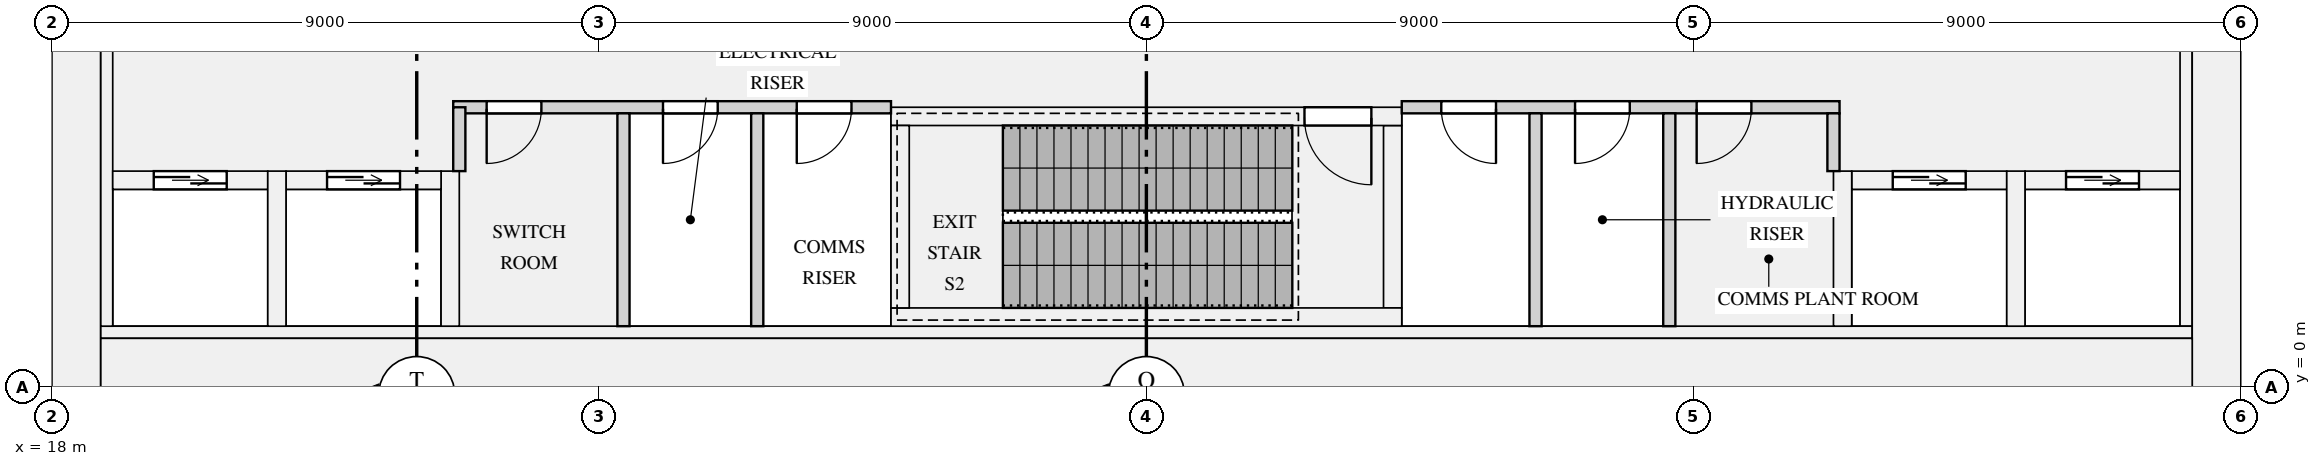
"""IFC4 building model, lengths in metres.
Left out: names, types, materials, properties, quantities, classifications, styles, units other than length and angle.
Written with IfcOpenShell. Run it as: python <this file> out.ifc"""

import sys

from ifc_helpers import new_model, si_unit, direction, frame, frame_2d, origin, place, context, subcontext, project, spatial, rectangle, extrude, element, fill, save


model = new_model("IFC4")
c1 = context("Model", 3, precision=1e-05, world=origin(), true_north=direction((0.0, 1.0)))
c2 = subcontext(c1, "Body", "Model", "MODEL_VIEW")
j1 = project(units=[si_unit("LENGTHUNIT", "METRE"), si_unit("PLANEANGLEUNIT", "RADIAN")], contexts=[c1])
p1 = place(None, origin())
s1 = spatial("IfcSite", under=j1, at=p1, CompositionType="ELEMENT")
p2 = place(p1, origin())
s2 = spatial("IfcBuilding", under=s1, at=p2, CompositionType="ELEMENT")
p3 = place(p2, frame((0.0, 0.0, 130.8)))
s3 = spatial("IfcBuildingStorey", under=s2, at=p3, CompositionType="ELEMENT", Elevation=130.8)
for number, where, z_axis, x_axis in (
    (1, (18.4, 0.0, 0.0), (0.0, 0.0, 1.0), (0.0, 1.0, 0.0)),
    (2, (53.6, 0.0, 0.0), (0.0, 0.0, 1.0), (0.0, 1.0, 0.0)),
):
    element("IfcWall", number, at=place(p3, frame(where, z_axis=z_axis, x_axis=x_axis)), inside=s3, PredefinedType="SHEAR", context=c2, shape_type="SweptSolid", body=[
        extrude(rectangle(XDim=12.5, YDim=0.8, at=frame_2d((6.25, 0.0))), origin(), (0.0, 0.0, 1.0), 6.3),
    ])
p4 = place(p3, frame((18.8, 0.4, 0.0), z_axis=(0.0, 0.0, 1.0), x_axis=(1.0, 0.0, 0.0)))
e3 = element("IfcWall", 3, at=p4, inside=s3, PredefinedType="SHEAR", context=c2, shape_type="SweptSolid", body=[
    extrude(rectangle(XDim=34.4, YDim=0.8, at=frame_2d((17.2, 0.0))), origin(), (0.0, 0.0, 1.0), 6.3),
])
for number, where, z_axis, x_axis in (
    (4, (18.9, 1.0, 0.0), (0.0, 0.0, 1.0), (0.0, 1.0, 0.0)),
    (5, (53.1, 1.0, 0.0), (0.0, 0.0, 1.0), (0.0, 1.0, 0.0)),
):
    element("IfcWall", number, at=place(p3, frame(where, z_axis=z_axis, x_axis=x_axis)), inside=s3, PredefinedType="SHEAR", context=c2, shape_type="SweptSolid", body=[
        extrude(rectangle(XDim=10.9, YDim=0.2, at=frame_2d((5.45, 0.0))), origin(), (0.0, 0.0, 1.0), 6.3),
    ])
p5 = place(p3, frame((18.8, 0.9, 0.0), z_axis=(0.0, 0.0, 1.0), x_axis=(1.0, 0.0, 0.0)))
e6 = element("IfcWall", 6, at=p5, inside=s3, PredefinedType="SHEAR", context=c2, shape_type="SweptSolid", body=[
    extrude(rectangle(XDim=34.4, YDim=0.2, at=frame_2d((17.2, 0.0))), origin(), (0.0, 0.0, 1.0), 6.3),
])
p6 = place(p3, frame((19.0, 3.4, 0.0), z_axis=(0.0, 0.0, 1.0), x_axis=(1.0, 0.0, 0.0)))
e7 = element("IfcWall", 7, at=p6, inside=s3, PredefinedType="SHEAR", context=c2, shape_type="SweptSolid", body=[
    extrude(rectangle(XDim=2.55, YDim=0.3, at=frame_2d((1.275, 0.0))), origin(), (0.0, 0.0, 1.0), 6.3),
])
p7 = place(p6, frame((0.675, 0.0, 0.0)))
e8 = element("IfcOpeningElement", 8, at=p7, cuts=e7, PredefinedType="OPENING", context=c2, shape_type="SweptSolid", body=[
    extrude(rectangle(XDim=1.2, YDim=2.1, at=frame_2d((0.6, 1.05))), frame((0.0, 0.16, 0.0), z_axis=(0.0, -1.0, 0.0), x_axis=(1.0, 0.0, 0.0)), (0.0, 0.0, 1.0), 0.32),
])
p8 = place(p3, frame((21.85, 3.4, 0.0), z_axis=(0.0, 0.0, 1.0), x_axis=(1.0, 0.0, 0.0)))
e9 = element("IfcWall", 9, at=p8, inside=s3, PredefinedType="SHEAR", context=c2, shape_type="SweptSolid", body=[
    extrude(rectangle(XDim=2.55, YDim=0.3, at=frame_2d((1.275, 0.0))), origin(), (0.0, 0.0, 1.0), 6.3),
])
p9 = place(p8, frame((0.675, 0.0, 0.0)))
e10 = element("IfcOpeningElement", 10, at=p9, cuts=e9, PredefinedType="OPENING", context=c2, shape_type="SweptSolid", body=[
    extrude(rectangle(XDim=1.2, YDim=2.1, at=frame_2d((0.6, 1.05))), frame((0.0, 0.16, 0.0), z_axis=(0.0, -1.0, 0.0), x_axis=(1.0, 0.0, 0.0)), (0.0, 0.0, 1.0), 0.32),
])
for number, where, z_axis, x_axis in (
    (11, (21.7, 1.0, 0.0), (0.0, 0.0, 1.0), (0.0, 1.0, 0.0)),
    (12, (24.55, 1.0, 0.0), (0.0, 0.0, 1.0), (0.0, 1.0, 0.0)),
):
    element("IfcWall", number, at=place(p3, frame(where, z_axis=z_axis, x_axis=x_axis)), inside=s3, PredefinedType="SHEAR", context=c2, shape_type="SweptSolid", body=[
        extrude(rectangle(XDim=2.55, YDim=0.3, at=frame_2d((1.275, 0.0))), origin(), (0.0, 0.0, 1.0), 6.3),
    ])
p10 = place(p3, frame((47.6, 3.4, 0.0), z_axis=(0.0, 0.0, 1.0), x_axis=(1.0, 0.0, 0.0)))
e13 = element("IfcWall", 13, at=p10, inside=s3, PredefinedType="SHEAR", context=c2, shape_type="SweptSolid", body=[
    extrude(rectangle(XDim=2.55, YDim=0.3, at=frame_2d((1.275, 0.0))), origin(), (0.0, 0.0, 1.0), 6.3),
])
p11 = place(p10, frame((0.675, 0.0, 0.0)))
e14 = element("IfcOpeningElement", 14, at=p11, cuts=e13, PredefinedType="OPENING", context=c2, shape_type="SweptSolid", body=[
    extrude(rectangle(XDim=1.2, YDim=2.1, at=frame_2d((0.6, 1.05))), frame((0.0, 0.16, 0.0), z_axis=(0.0, -1.0, 0.0), x_axis=(1.0, 0.0, 0.0)), (0.0, 0.0, 1.0), 0.32),
])
p12 = place(p3, frame((47.45, 1.0, 0.0), z_axis=(0.0, 0.0, 1.0), x_axis=(0.0, 1.0, 0.0)))
e15 = element("IfcWall", 15, at=p12, inside=s3, PredefinedType="SHEAR", context=c2, shape_type="SweptSolid", body=[
    extrude(rectangle(XDim=2.55, YDim=0.3, at=frame_2d((1.275, 0.0))), origin(), (0.0, 0.0, 1.0), 6.3),
])
p13 = place(p3, frame((50.45, 3.4, 0.0), z_axis=(0.0, 0.0, 1.0), x_axis=(1.0, 0.0, 0.0)))
e16 = element("IfcWall", 16, at=p13, inside=s3, PredefinedType="SHEAR", context=c2, shape_type="SweptSolid", body=[
    extrude(rectangle(XDim=2.55, YDim=0.3, at=frame_2d((1.275, 0.0))), origin(), (0.0, 0.0, 1.0), 6.3),
])
p14 = place(p13, frame((0.675, 0.0, 0.0)))
e17 = element("IfcOpeningElement", 17, at=p14, cuts=e16, PredefinedType="OPENING", context=c2, shape_type="SweptSolid", body=[
    extrude(rectangle(XDim=1.2, YDim=2.1, at=frame_2d((0.6, 1.05))), frame((0.0, 0.16, 0.0), z_axis=(0.0, -1.0, 0.0), x_axis=(1.0, 0.0, 0.0)), (0.0, 0.0, 1.0), 0.32),
])
p15 = place(p3, frame((50.3, 1.0, 0.0), z_axis=(0.0, 0.0, 1.0), x_axis=(0.0, 1.0, 0.0)))
e18 = element("IfcWall", 18, at=p15, inside=s3, PredefinedType="SHEAR", context=c2, shape_type="SweptSolid", body=[
    extrude(rectangle(XDim=2.55, YDim=0.3, at=frame_2d((1.275, 0.0))), origin(), (0.0, 0.0, 1.0), 6.3),
])
p16 = place(p3, frame((31.8, 1.15, 0.0), z_axis=(0.0, 0.0, 1.0), x_axis=(1.0, 0.0, 0.0)))
e19 = element("IfcWall", 19, at=p16, inside=s3, PredefinedType="SHEAR", context=c2, shape_type="SweptSolid", body=[
    extrude(rectangle(XDim=8.4, YDim=0.3, at=frame_2d((4.2, 0.0))), origin(), (0.0, 0.0, 1.0), 6.3),
])
p17 = place(p3, frame((31.8, 4.45, 0.0), z_axis=(0.0, 0.0, 1.0), x_axis=(1.0, 0.0, 0.0)))
e20 = element("IfcWall", 20, at=p17, inside=s3, PredefinedType="SHEAR", context=c2, shape_type="SweptSolid", body=[
    extrude(rectangle(XDim=8.4, YDim=0.3, at=frame_2d((4.2, 0.0))), origin(), (0.0, 0.0, 1.0), 6.3),
])
p18 = place(p17, frame((6.8, 0.0, 0.0)))
e21 = element("IfcOpeningElement", 21, at=p18, cuts=e20, PredefinedType="OPENING", context=c2, shape_type="SweptSolid", body=[
    extrude(rectangle(XDim=1.1, YDim=2.1, at=frame_2d((0.55, 1.05))), frame((0.0, 0.16, 0.0), z_axis=(0.0, -1.0, 0.0), x_axis=(1.0, 0.0, 0.0)), (0.0, 0.0, 1.0), 0.32),
])
for number, where, z_axis, x_axis in (
    (22, (31.95, 1.3, 0.0), (0.0, 0.0, 1.0), (0.0, 1.0, 0.0)),
    (23, (40.05, 1.3, 0.0), (0.0, 0.0, 1.0), (0.0, 1.0, 0.0)),
):
    element("IfcWall", number, at=place(p3, frame(where, z_axis=z_axis, x_axis=x_axis)), inside=s3, PredefinedType="SHEAR", context=c2, shape_type="SweptSolid", body=[
        extrude(rectangle(XDim=3.0, YDim=0.3, at=frame_2d((1.5, 0.0))), origin(), (0.0, 0.0, 1.0), 6.3),
    ])
p19 = place(p3, frame((24.6, 4.6, 0.0), z_axis=(0.0, 0.0, 1.0), x_axis=(1.0, 0.0, 0.0)))
e24 = element("IfcWall", 24, at=p19, inside=s3, PredefinedType="PARTITIONING", context=c2, shape_type="SweptSolid", body=[
    extrude(rectangle(XDim=7.2, YDim=0.2, at=frame_2d((3.6, 0.0))), origin(), (0.0, 0.0, 1.0), 5.8),
])
p20 = place(p19, frame((0.55, 0.0, 0.0)))
e25 = element("IfcOpeningElement", 25, at=p20, cuts=e24, PredefinedType="OPENING", context=c2, shape_type="SweptSolid", body=[
    extrude(rectangle(XDim=0.9, YDim=2.1, at=frame_2d((0.45, 1.05))), frame((0.0, 0.11, 0.0), z_axis=(0.0, -1.0, 0.0), x_axis=(1.0, 0.0, 0.0)), (0.0, 0.0, 1.0), 0.22),
])
p21 = place(p19, frame((3.45, 0.0, 0.0)))
e26 = element("IfcOpeningElement", 26, at=p21, cuts=e24, PredefinedType="OPENING", context=c2, shape_type="SweptSolid", body=[
    extrude(rectangle(XDim=0.9, YDim=2.1, at=frame_2d((0.45, 1.05))), frame((0.0, 0.11, 0.0), z_axis=(0.0, -1.0, 0.0), x_axis=(1.0, 0.0, 0.0)), (0.0, 0.0, 1.0), 0.22),
])
p22 = place(p19, frame((5.65, 0.0, 0.0)))
e27 = element("IfcOpeningElement", 27, at=p22, cuts=e24, PredefinedType="OPENING", context=c2, shape_type="SweptSolid", body=[
    extrude(rectangle(XDim=0.9, YDim=2.1, at=frame_2d((0.45, 1.05))), frame((0.0, 0.11, 0.0), z_axis=(0.0, -1.0, 0.0), x_axis=(1.0, 0.0, 0.0)), (0.0, 0.0, 1.0), 0.22),
])
p23 = place(p3, frame((40.2, 4.6, 0.0), z_axis=(0.0, 0.0, 1.0), x_axis=(1.0, 0.0, 0.0)))
e28 = element("IfcWall", 28, at=p23, inside=s3, PredefinedType="PARTITIONING", context=c2, shape_type="SweptSolid", body=[
    extrude(rectangle(XDim=7.2, YDim=0.2, at=frame_2d((3.6, 0.0))), origin(), (0.0, 0.0, 1.0), 5.8),
])
p24 = place(p23, frame((4.85, 0.0, 0.0)))
e29 = element("IfcOpeningElement", 29, at=p24, cuts=e28, PredefinedType="OPENING", context=c2, shape_type="SweptSolid", body=[
    extrude(rectangle(XDim=0.9, YDim=2.1, at=frame_2d((0.45, 1.05))), frame((0.0, 0.11, 0.0), z_axis=(0.0, -1.0, 0.0), x_axis=(1.0, 0.0, 0.0)), (0.0, 0.0, 1.0), 0.22),
])
p25 = place(p23, frame((0.65, 0.0, 0.0)))
e30 = element("IfcOpeningElement", 30, at=p25, cuts=e28, PredefinedType="OPENING", context=c2, shape_type="SweptSolid", body=[
    extrude(rectangle(XDim=0.9, YDim=2.1, at=frame_2d((0.45, 1.05))), frame((0.0, 0.11, 0.0), z_axis=(0.0, -1.0, 0.0), x_axis=(1.0, 0.0, 0.0)), (0.0, 0.0, 1.0), 0.22),
])
p26 = place(p23, frame((2.85, 0.0, 0.0)))
e31 = element("IfcOpeningElement", 31, at=p26, cuts=e28, PredefinedType="OPENING", context=c2, shape_type="SweptSolid", body=[
    extrude(rectangle(XDim=0.9, YDim=2.1, at=frame_2d((0.45, 1.05))), frame((0.0, 0.11, 0.0), z_axis=(0.0, -1.0, 0.0), x_axis=(1.0, 0.0, 0.0)), (0.0, 0.0, 1.0), 0.22),
])
for number, where, z_axis, x_axis in (
    (32, (27.4, 1.0, 0.0), (0.0, 0.0, 1.0), (0.0, 1.0, 0.0)),
    (33, (29.6, 1.0, 0.0), (0.0, 0.0, 1.0), (0.0, 1.0, 0.0)),
    (34, (42.4, 1.0, 0.0), (0.0, 0.0, 1.0), (0.0, 1.0, 0.0)),
    (35, (44.6, 1.0, 0.0), (0.0, 0.0, 1.0), (0.0, 1.0, 0.0)),
):
    element("IfcWall", number, at=place(p3, frame(where, z_axis=z_axis, x_axis=x_axis)), inside=s3, PredefinedType="PARTITIONING", context=c2, shape_type="SweptSolid", body=[
        extrude(rectangle(XDim=3.5, YDim=0.2, at=frame_2d((1.75, 0.0))), origin(), (0.0, 0.0, 1.0), 5.8),
    ])
p27 = place(p3, frame((24.7, 3.55, 0.0), z_axis=(0.0, 0.0, 1.0), x_axis=(0.0, 1.0, 0.0)))
e36 = element("IfcWall", 36, at=p27, inside=s3, PredefinedType="PARTITIONING", context=c2, shape_type="SweptSolid", body=[
    extrude(rectangle(XDim=1.05, YDim=0.2, at=frame_2d((0.525, 0.0))), origin(), (0.0, 0.0, 1.0), 5.8),
])
p28 = place(p3, frame((47.3, 3.55, 0.0), z_axis=(0.0, 0.0, 1.0), x_axis=(0.0, 1.0, 0.0)))
e37 = element("IfcWall", 37, at=p28, inside=s3, PredefinedType="PARTITIONING", context=c2, shape_type="SweptSolid", body=[
    extrude(rectangle(XDim=0.95, YDim=0.2, at=frame_2d((0.475, 0.0))), origin(), (0.0, 0.0, 1.0), 5.8),
])
p29 = place(p7, origin())
e38 = element("IfcDoor", 38, at=p29, inside=s3, OperationType="DOUBLE_DOOR_SLIDING", PredefinedType="DOOR", context=c2, shape_type="SweptSolid", body=[
    extrude(rectangle(XDim=1.2, YDim=2.1, at=frame_2d((0.6, 1.05))), frame((0.0, 0.025, 0.0), z_axis=(0.0, -1.0, 0.0), x_axis=(1.0, 0.0, 0.0)), (0.0, 0.0, 1.0), 0.05),
])
fill(e8, e38)
p30 = place(p9, origin())
e39 = element("IfcDoor", 39, at=p30, inside=s3, OperationType="DOUBLE_DOOR_SLIDING", PredefinedType="DOOR", context=c2, shape_type="SweptSolid", body=[
    extrude(rectangle(XDim=1.2, YDim=2.1, at=frame_2d((0.6, 1.05))), frame((0.0, 0.025, 0.0), z_axis=(0.0, -1.0, 0.0), x_axis=(1.0, 0.0, 0.0)), (0.0, 0.0, 1.0), 0.05),
])
fill(e10, e39)
p31 = place(p11, origin())
e40 = element("IfcDoor", 40, at=p31, inside=s3, OperationType="DOUBLE_DOOR_SLIDING", PredefinedType="DOOR", context=c2, shape_type="SweptSolid", body=[
    extrude(rectangle(XDim=1.2, YDim=2.1, at=frame_2d((0.6, 1.05))), frame((0.0, 0.025, 0.0), z_axis=(0.0, -1.0, 0.0), x_axis=(1.0, 0.0, 0.0)), (0.0, 0.0, 1.0), 0.05),
])
fill(e14, e40)
p32 = place(p14, origin())
e41 = element("IfcDoor", 41, at=p32, inside=s3, OperationType="DOUBLE_DOOR_SLIDING", PredefinedType="DOOR", context=c2, shape_type="SweptSolid", body=[
    extrude(rectangle(XDim=1.2, YDim=2.1, at=frame_2d((0.6, 1.05))), frame((0.0, 0.025, 0.0), z_axis=(0.0, -1.0, 0.0), x_axis=(1.0, 0.0, 0.0)), (0.0, 0.0, 1.0), 0.05),
])
fill(e17, e41)
p33 = place(p18, frame((1.1, 0.0, 0.0), z_axis=(0.0, 0.0, 1.0), x_axis=(-1.0, 0.0, 0.0)))
e42 = element("IfcDoor", 42, at=p33, inside=s3, OperationType="SINGLE_SWING_LEFT", PredefinedType="DOOR", context=c2, shape_type="SweptSolid", body=[
    extrude(rectangle(XDim=1.1, YDim=2.1, at=frame_2d((0.55, 1.05))), frame((0.0, 0.025, 0.0), z_axis=(0.0, -1.0, 0.0), x_axis=(1.0, 0.0, 0.0)), (0.0, 0.0, 1.0), 0.05),
])
fill(e21, e42)
p34 = place(p20, frame((0.9, 0.0, 0.0), z_axis=(0.0, 0.0, 1.0), x_axis=(-1.0, 0.0, 0.0)))
e43 = element("IfcDoor", 43, at=p34, inside=s3, OperationType="SINGLE_SWING_RIGHT", PredefinedType="DOOR", context=c2, shape_type="SweptSolid", body=[
    extrude(rectangle(XDim=0.9, YDim=2.1, at=frame_2d((0.45, 1.05))), frame((0.0, 0.025, 0.0), z_axis=(0.0, -1.0, 0.0), x_axis=(1.0, 0.0, 0.0)), (0.0, 0.0, 1.0), 0.05),
])
fill(e25, e43)
p35 = place(p24, frame((0.9, 0.0, 0.0), z_axis=(0.0, 0.0, 1.0), x_axis=(-1.0, 0.0, 0.0)))
e44 = element("IfcDoor", 44, at=p35, inside=s3, OperationType="SINGLE_SWING_RIGHT", PredefinedType="DOOR", context=c2, shape_type="SweptSolid", body=[
    extrude(rectangle(XDim=0.9, YDim=2.1, at=frame_2d((0.45, 1.05))), frame((0.0, 0.025, 0.0), z_axis=(0.0, -1.0, 0.0), x_axis=(1.0, 0.0, 0.0)), (0.0, 0.0, 1.0), 0.05),
])
fill(e29, e44)
p36 = place(p21, frame((0.9, 0.0, 0.0), z_axis=(0.0, 0.0, 1.0), x_axis=(-1.0, 0.0, 0.0)))
e45 = element("IfcDoor", 45, at=p36, inside=s3, OperationType="SINGLE_SWING_RIGHT", PredefinedType="DOOR", context=c2, shape_type="SweptSolid", body=[
    extrude(rectangle(XDim=0.9, YDim=2.1, at=frame_2d((0.45, 1.05))), frame((0.0, 0.025, 0.0), z_axis=(0.0, -1.0, 0.0), x_axis=(1.0, 0.0, 0.0)), (0.0, 0.0, 1.0), 0.05),
])
fill(e26, e45)
p37 = place(p22, frame((0.9, 0.0, 0.0), z_axis=(0.0, 0.0, 1.0), x_axis=(-1.0, 0.0, 0.0)))
e46 = element("IfcDoor", 46, at=p37, inside=s3, OperationType="SINGLE_SWING_RIGHT", PredefinedType="DOOR", context=c2, shape_type="SweptSolid", body=[
    extrude(rectangle(XDim=0.9, YDim=2.1, at=frame_2d((0.45, 1.05))), frame((0.0, 0.025, 0.0), z_axis=(0.0, -1.0, 0.0), x_axis=(1.0, 0.0, 0.0)), (0.0, 0.0, 1.0), 0.05),
])
fill(e27, e46)
p38 = place(p25, frame((0.9, 0.0, 0.0), z_axis=(0.0, 0.0, 1.0), x_axis=(-1.0, 0.0, 0.0)))
e47 = element("IfcDoor", 47, at=p38, inside=s3, OperationType="SINGLE_SWING_LEFT", PredefinedType="DOOR", context=c2, shape_type="SweptSolid", body=[
    extrude(rectangle(XDim=0.9, YDim=2.1, at=frame_2d((0.45, 1.05))), frame((0.0, 0.025, 0.0), z_axis=(0.0, -1.0, 0.0), x_axis=(1.0, 0.0, 0.0)), (0.0, 0.0, 1.0), 0.05),
])
fill(e30, e47)
p39 = place(p26, frame((0.9, 0.0, 0.0), z_axis=(0.0, 0.0, 1.0), x_axis=(-1.0, 0.0, 0.0)))
e48 = element("IfcDoor", 48, at=p39, inside=s3, OperationType="SINGLE_SWING_RIGHT", PredefinedType="DOOR", context=c2, shape_type="SweptSolid", body=[
    extrude(rectangle(XDim=0.9, YDim=2.1, at=frame_2d((0.45, 1.05))), frame((0.0, 0.025, 0.0), z_axis=(0.0, -1.0, 0.0), x_axis=(1.0, 0.0, 0.0)), (0.0, 0.0, 1.0), 0.05),
])
fill(e31, e48)
save(model, sys.argv[1])
